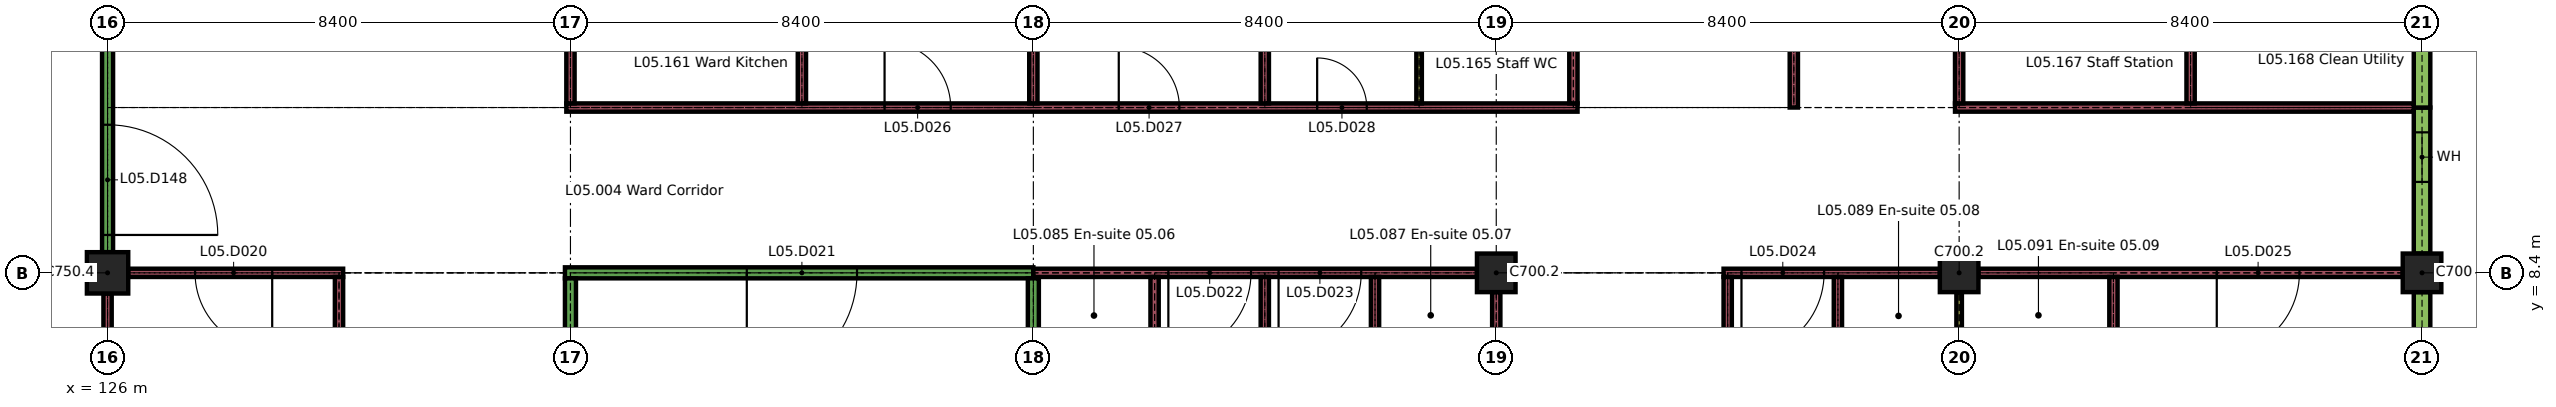
"""IFC4 building model, lengths in metres.
Left out: names, types, materials, properties, quantities, classifications, styles, units other than length and angle.
Written with IfcOpenShell. Run it as: python <this file> out.ifc"""

import sys

from ifc_helpers import new_model, si_unit, direction, frame, frame_2d, origin, origin_2d, place, context, subcontext, project, spatial, rectangle, extrude, element, fill, save


model = new_model("IFC4")
c1 = context("Model", 3, precision=1e-05, world=origin(), true_north=direction((0.0, 1.0)))
c2 = subcontext(c1, "Body", "Model", "MODEL_VIEW")
j1 = project(units=[si_unit("LENGTHUNIT", "METRE"), si_unit("PLANEANGLEUNIT", "RADIAN")], contexts=[c1])
p1 = place(None, origin())
s1 = spatial("IfcSite", under=j1, at=p1, CompositionType="ELEMENT")
p2 = place(p1, origin())
s2 = spatial("IfcBuilding", under=s1, at=p2, CompositionType="ELEMENT")
p3 = place(p2, frame((0.0, 0.0, 22.5)))
s3 = spatial("IfcBuildingStorey", under=s2, at=p3, CompositionType="ELEMENT", Elevation=22.5)
p4 = place(p3, frame((126.0, 8.4, 0.0), z_axis=(0.0, 0.0, 1.0), x_axis=(1.0, 0.0, 0.0)))
e1 = element("IfcColumn", 1, at=p4, inside=s3, PredefinedType="COLUMN", context=c2, shape_type="SweptSolid", body=[
    extrude(rectangle(XDim=0.75, YDim=0.75, at=origin_2d()), origin(), (0.0, 0.0, 1.0), 3.26),
])
for number, where, z_axis, x_axis in (
    (2, (151.2, 8.4, 0.0), (0.0, 0.0, 1.0), (1.0, 0.0, 0.0)),
    (3, (159.6, 8.4, 0.0), (0.0, 0.0, 1.0), (1.0, 0.0, 0.0)),
    (4, (168.0, 8.4, 0.0), (0.0, 0.0, 1.0), (1.0, 0.0, 0.0)),
):
    element("IfcColumn", number, at=place(p3, frame(where, z_axis=z_axis, x_axis=x_axis)), inside=s3, PredefinedType="COLUMN", context=c2, shape_type="SweptSolid", body=[
        extrude(rectangle(XDim=0.7, YDim=0.7, at=origin_2d()), origin(), (0.0, 0.0, 1.0), 3.26),
    ])
p5 = place(p3, frame((168.0, 0.35, 0.0), z_axis=(0.0, 0.0, 1.0), x_axis=(0.0, 1.0, 0.0)))
e5 = element("IfcWall", 5, at=p5, inside=s3, PredefinedType="SOLIDWALL", context=c2, shape_type="SweptSolid", body=[
    extrude(rectangle(XDim=7.7, YDim=0.3, at=frame_2d((3.85, 0.0))), origin(), (0.0, 0.0, 1.0), 2.96),
])
p6 = place(p5, frame((0.7, 0.0, 0.9)))
e6 = element("IfcOpeningElement", 6, at=p6, cuts=e5, PredefinedType="OPENING", context=c2, shape_type="SweptSolid", body=[
    extrude(rectangle(XDim=2.1, YDim=1.5, at=frame_2d((1.05, 0.75))), frame((0.0, 0.16, 0.0), z_axis=(0.0, -1.0, 0.0), x_axis=(1.0, 0.0, 0.0)), (0.0, 0.0, 1.0), 0.32),
])
p7 = place(p5, frame((4.9, 0.0, 0.9)))
e7 = element("IfcOpeningElement", 7, at=p7, cuts=e5, PredefinedType="OPENING", context=c2, shape_type="SweptSolid", body=[
    extrude(rectangle(XDim=2.1, YDim=1.5, at=frame_2d((1.05, 0.75))), frame((0.0, 0.16, 0.0), z_axis=(0.0, -1.0, 0.0), x_axis=(1.0, 0.0, 0.0)), (0.0, 0.0, 1.0), 0.32),
])
p8 = place(p3, frame((168.0, 8.75, 0.0), z_axis=(0.0, 0.0, 1.0), x_axis=(0.0, 1.0, 0.0)))
e8 = element("IfcWall", 8, at=p8, inside=s3, PredefinedType="SOLIDWALL", context=c2, shape_type="SweptSolid", body=[
    extrude(rectangle(XDim=2.65, YDim=0.3, at=frame_2d((1.325, 0.0))), origin(), (0.0, 0.0, 1.0), 2.96),
])
p9 = place(p8, frame((1.3, 0.0, 0.9)))
e9 = element("IfcOpeningElement", 9, at=p9, cuts=e8, PredefinedType="OPENING", context=c2, shape_type="SweptSolid", body=[
    extrude(rectangle(XDim=0.9, YDim=1.5, at=frame_2d((0.45, 0.75))), frame((0.0, 0.16, 0.0), z_axis=(0.0, -1.0, 0.0), x_axis=(1.0, 0.0, 0.0)), (0.0, 0.0, 1.0), 0.32),
])
p10 = place(p3, frame((168.0, 11.4, 0.0), z_axis=(0.0, 0.0, 1.0), x_axis=(0.0, 1.0, 0.0)))
e10 = element("IfcWall", 10, at=p10, inside=s3, PredefinedType="SOLIDWALL", context=c2, shape_type="SweptSolid", body=[
    extrude(rectangle(XDim=2.4, YDim=0.3, at=frame_2d((1.2, 0.0))), origin(), (0.0, 0.0, 1.0), 2.96),
])
p11 = place(p3, frame((126.375, 8.4, 0.0), z_axis=(0.0, 0.0, 1.0), x_axis=(1.0, 0.0, 0.0)))
e11 = element("IfcWall", 11, at=p11, inside=s3, PredefinedType="PARTITIONING", context=c2, shape_type="SweptSolid", body=[
    extrude(rectangle(XDim=3.9, YDim=0.15, at=frame_2d((1.95, 0.0))), origin(), (0.0, 0.0, 1.0), 3.26),
])
p12 = place(p11, frame((1.212, 0.0, 0.0)))
e12 = element("IfcOpeningElement", 12, at=p12, cuts=e11, PredefinedType="OPENING", context=c2, shape_type="SweptSolid", body=[
    extrude(rectangle(XDim=1.4, YDim=2.1, at=frame_2d((0.7, 1.05))), frame((0.0, 0.085, 0.0), z_axis=(0.0, -1.0, 0.0), x_axis=(1.0, 0.0, 0.0)), (0.0, 0.0, 1.0), 0.17),
])
p13 = place(p3, frame((134.3, 8.4, 0.0), z_axis=(0.0, 0.0, 1.0), x_axis=(1.0, 0.0, 0.0)))
e13 = element("IfcWall", 13, at=p13, inside=s3, PredefinedType="PARTITIONING", context=c2, shape_type="SweptSolid", body=[
    extrude(rectangle(XDim=8.5, YDim=0.2, at=frame_2d((4.25, 0.0))), origin(), (0.0, 0.0, 1.0), 3.26),
])
p14 = place(p13, frame((3.3, 0.0, 0.0)))
e14 = element("IfcOpeningElement", 14, at=p14, cuts=e13, PredefinedType="OPENING", context=c2, shape_type="SweptSolid", body=[
    extrude(rectangle(XDim=2.0, YDim=2.4, at=frame_2d((1.0, 1.2))), frame((0.0, 0.11, 0.0), z_axis=(0.0, -1.0, 0.0), x_axis=(1.0, 0.0, 0.0)), (0.0, 0.0, 1.0), 0.22),
])
p15 = place(p3, frame((142.8, 8.4, 0.0), z_axis=(0.0, 0.0, 1.0), x_axis=(1.0, 0.0, 0.0)))
e15 = element("IfcWall", 15, at=p15, inside=s3, PredefinedType="PARTITIONING", context=c2, shape_type="SweptSolid", body=[
    extrude(rectangle(XDim=8.05, YDim=0.15, at=frame_2d((4.025, 0.0))), origin(), (0.0, 0.0, 1.0), 3.26),
])
p16 = place(p15, frame((2.45, 0.0, 0.0)))
e16 = element("IfcOpeningElement", 16, at=p16, cuts=e15, PredefinedType="OPENING", context=c2, shape_type="SweptSolid", body=[
    extrude(rectangle(XDim=1.5, YDim=2.4, at=frame_2d((0.75, 1.2))), frame((0.0, 0.085, 0.0), z_axis=(0.0, -1.0, 0.0), x_axis=(1.0, 0.0, 0.0)), (0.0, 0.0, 1.0), 0.17),
])
p17 = place(p15, frame((4.45, 0.0, 0.0)))
e17 = element("IfcOpeningElement", 17, at=p17, cuts=e15, PredefinedType="OPENING", context=c2, shape_type="SweptSolid", body=[
    extrude(rectangle(XDim=1.5, YDim=2.4, at=frame_2d((0.75, 1.2))), frame((0.0, 0.085, 0.0), z_axis=(0.0, -1.0, 0.0), x_axis=(1.0, 0.0, 0.0)), (0.0, 0.0, 1.0), 0.17),
])
p18 = place(p3, frame((155.325, 8.4, 0.0), z_axis=(0.0, 0.0, 1.0), x_axis=(1.0, 0.0, 0.0)))
e18 = element("IfcWall", 18, at=p18, inside=s3, PredefinedType="PARTITIONING", context=c2, shape_type="SweptSolid", body=[
    extrude(rectangle(XDim=3.925, YDim=0.15, at=frame_2d((1.962, 0.0))), origin(), (0.0, 0.0, 1.0), 3.26),
])
p19 = place(p18, frame((0.325, 0.0, 0.0)))
e19 = element("IfcOpeningElement", 19, at=p19, cuts=e18, PredefinedType="OPENING", context=c2, shape_type="SweptSolid", body=[
    extrude(rectangle(XDim=1.5, YDim=2.4, at=frame_2d((0.75, 1.2))), frame((0.0, 0.085, 0.0), z_axis=(0.0, -1.0, 0.0), x_axis=(1.0, 0.0, 0.0)), (0.0, 0.0, 1.0), 0.17),
])
p20 = place(p3, frame((159.95, 8.4, 0.0), z_axis=(0.0, 0.0, 1.0), x_axis=(1.0, 0.0, 0.0)))
e20 = element("IfcWall", 20, at=p20, inside=s3, PredefinedType="PARTITIONING", context=c2, shape_type="SweptSolid", body=[
    extrude(rectangle(XDim=7.7, YDim=0.15, at=frame_2d((3.85, 0.0))), origin(), (0.0, 0.0, 1.0), 3.26),
])
p21 = place(p20, frame((4.325, 0.0, 0.0)))
e21 = element("IfcOpeningElement", 21, at=p21, cuts=e20, PredefinedType="OPENING", context=c2, shape_type="SweptSolid", body=[
    extrude(rectangle(XDim=1.5, YDim=2.4, at=frame_2d((0.75, 1.2))), frame((0.0, 0.085, 0.0), z_axis=(0.0, -1.0, 0.0), x_axis=(1.0, 0.0, 0.0)), (0.0, 0.0, 1.0), 0.17),
])
p22 = place(p3, frame((134.325, 11.4, 0.0), z_axis=(0.0, 0.0, 1.0), x_axis=(1.0, 0.0, 0.0)))
e22 = element("IfcWall", 22, at=p22, inside=s3, PredefinedType="PARTITIONING", context=c2, shape_type="SweptSolid", body=[
    extrude(rectangle(XDim=18.35, YDim=0.15, at=frame_2d((9.175, 0.0))), origin(), (0.0, 0.0, 1.0), 3.26),
])
p23 = place(p22, frame((5.775, 0.0, 0.0)))
e23 = element("IfcOpeningElement", 23, at=p23, cuts=e22, PredefinedType="OPENING", context=c2, shape_type="SweptSolid", body=[
    extrude(rectangle(XDim=1.2, YDim=2.1, at=frame_2d((0.6, 1.05))), frame((0.0, 0.085, 0.0), z_axis=(0.0, -1.0, 0.0), x_axis=(1.0, 0.0, 0.0)), (0.0, 0.0, 1.0), 0.17),
])
p24 = place(p22, frame((10.025, 0.0, 0.0)))
e24 = element("IfcOpeningElement", 24, at=p24, cuts=e22, PredefinedType="OPENING", context=c2, shape_type="SweptSolid", body=[
    extrude(rectangle(XDim=1.1, YDim=2.1, at=frame_2d((0.55, 1.05))), frame((0.0, 0.085, 0.0), z_axis=(0.0, -1.0, 0.0), x_axis=(1.0, 0.0, 0.0)), (0.0, 0.0, 1.0), 0.17),
])
p25 = place(p22, frame((13.625, 0.0, 0.0)))
e25 = element("IfcOpeningElement", 25, at=p25, cuts=e22, PredefinedType="OPENING", context=c2, shape_type="SweptSolid", body=[
    extrude(rectangle(XDim=0.9, YDim=2.1, at=frame_2d((0.45, 1.05))), frame((0.0, 0.085, 0.0), z_axis=(0.0, -1.0, 0.0), x_axis=(1.0, 0.0, 0.0)), (0.0, 0.0, 1.0), 0.17),
])
p26 = place(p3, frame((159.525, 11.4, 0.0), z_axis=(0.0, 0.0, 1.0), x_axis=(1.0, 0.0, 0.0)))
e26 = element("IfcWall", 26, at=p26, inside=s3, PredefinedType="PARTITIONING", context=c2, shape_type="SweptSolid", body=[
    extrude(rectangle(XDim=8.325, YDim=0.15, at=frame_2d((4.163, 0.0))), origin(), (0.0, 0.0, 1.0), 3.26),
])
p27 = place(p3, frame((126.0, 0.375, 0.0), z_axis=(0.0, 0.0, 1.0), x_axis=(0.0, 1.0, 0.0)))
e27 = element("IfcWall", 27, at=p27, inside=s3, PredefinedType="PARTITIONING", context=c2, shape_type="SweptSolid", body=[
    extrude(rectangle(XDim=7.65, YDim=0.15, at=frame_2d((3.825, 0.0))), origin(), (0.0, 0.0, 1.0), 3.26),
])
p28 = place(p3, frame((126.0, 8.775, 0.0), z_axis=(0.0, 0.0, 1.0), x_axis=(0.0, 1.0, 0.0)))
e28 = element("IfcWall", 28, at=p28, inside=s3, PredefinedType="PARTITIONING", context=c2, shape_type="SweptSolid", body=[
    extrude(rectangle(XDim=7.925, YDim=0.2, at=frame_2d((3.962, 0.0))), origin(), (0.0, 0.0, 1.0), 3.26),
])
p29 = place(p28, frame((0.312, 0.0, 0.0)))
e29 = element("IfcOpeningElement", 29, at=p29, cuts=e28, PredefinedType="OPENING", context=c2, shape_type="SweptSolid", body=[
    extrude(rectangle(XDim=2.0, YDim=2.4, at=frame_2d((1.0, 1.2))), frame((0.0, 0.11, 0.0), z_axis=(0.0, -1.0, 0.0), x_axis=(1.0, 0.0, 0.0)), (0.0, 0.0, 1.0), 0.22),
])
p30 = place(p28, frame((5.475, 0.0, 0.0)))
e30 = element("IfcOpeningElement", 30, at=p30, cuts=e28, PredefinedType="OPENING", context=c2, shape_type="SweptSolid", body=[
    extrude(rectangle(XDim=2.0, YDim=2.4, at=frame_2d((1.0, 1.2))), frame((0.0, 0.11, 0.0), z_axis=(0.0, -1.0, 0.0), x_axis=(1.0, 0.0, 0.0)), (0.0, 0.0, 1.0), 0.22),
])
p31 = place(p3, frame((130.2, 0.15, 0.0), z_axis=(0.0, 0.0, 1.0), x_axis=(0.0, 1.0, 0.0)))
e31 = element("IfcWall", 31, at=p31, inside=s3, PredefinedType="PARTITIONING", context=c2, shape_type="SweptSolid", body=[
    extrude(rectangle(XDim=8.175, YDim=0.15, at=frame_2d((4.087, 0.0))), origin(), (0.0, 0.0, 1.0), 3.26),
])
p32 = place(p3, frame((134.4, 3.6, 0.0), z_axis=(0.0, 0.0, 1.0), x_axis=(0.0, 1.0, 0.0)))
e32 = element("IfcWall", 32, at=p32, inside=s3, PredefinedType="PARTITIONING", context=c2, shape_type="SweptSolid", body=[
    extrude(rectangle(XDim=4.7, YDim=0.2, at=frame_2d((2.35, 0.0))), origin(), (0.0, 0.0, 1.0), 3.26),
])
for number, where, z_axis, x_axis in (
    (33, (134.4, 11.475, 0.0), (0.0, 0.0, 1.0), (0.0, 1.0, 0.0)),
    (34, (138.6, 11.475, 0.0), (0.0, 0.0, 1.0), (0.0, 1.0, 0.0)),
):
    element("IfcWall", number, at=place(p3, frame(where, z_axis=z_axis, x_axis=x_axis)), inside=s3, PredefinedType="PARTITIONING", context=c2, shape_type="SweptSolid", body=[
        extrude(rectangle(XDim=2.25, YDim=0.15, at=frame_2d((1.125, 0.0))), origin(), (0.0, 0.0, 1.0), 3.26),
    ])
p33 = place(p3, frame((142.8, 3.6, 0.0), z_axis=(0.0, 0.0, 1.0), x_axis=(0.0, 1.0, 0.0)))
e35 = element("IfcWall", 35, at=p33, inside=s3, PredefinedType="PARTITIONING", context=c2, shape_type="SweptSolid", body=[
    extrude(rectangle(XDim=4.7, YDim=0.2, at=frame_2d((2.35, 0.0))), origin(), (0.0, 0.0, 1.0), 3.26),
])
for number, where, z_axis, x_axis in (
    (36, (142.8, 11.475, 0.0), (0.0, 0.0, 1.0), (0.0, 1.0, 0.0)),
    (37, (145.0, 6.075, 0.0), (0.0, 0.0, 1.0), (0.0, 1.0, 0.0)),
):
    element("IfcWall", number, at=place(p3, frame(where, z_axis=z_axis, x_axis=x_axis)), inside=s3, PredefinedType="PARTITIONING", context=c2, shape_type="SweptSolid", body=[
        extrude(rectangle(XDim=2.25, YDim=0.15, at=frame_2d((1.125, 0.0))), origin(), (0.0, 0.0, 1.0), 3.26),
    ])
p34 = place(p3, frame((147.0, 0.15, 0.0), z_axis=(0.0, 0.0, 1.0), x_axis=(0.0, 1.0, 0.0)))
e38 = element("IfcWall", 38, at=p34, inside=s3, PredefinedType="PARTITIONING", context=c2, shape_type="SweptSolid", body=[
    extrude(rectangle(XDim=8.175, YDim=0.15, at=frame_2d((4.087, 0.0))), origin(), (0.0, 0.0, 1.0), 3.26),
])
for number, where, z_axis, x_axis in (
    (39, (147.0, 11.475, 0.0), (0.0, 0.0, 1.0), (0.0, 1.0, 0.0)),
    (40, (149.0, 6.075, 0.0), (0.0, 0.0, 1.0), (0.0, 1.0, 0.0)),
):
    element("IfcWall", number, at=place(p3, frame(where, z_axis=z_axis, x_axis=x_axis)), inside=s3, PredefinedType="PARTITIONING", context=c2, shape_type="SweptSolid", body=[
        extrude(rectangle(XDim=2.25, YDim=0.15, at=frame_2d((1.125, 0.0))), origin(), (0.0, 0.0, 1.0), 3.26),
    ])
p35 = place(p3, frame((149.8, 11.475, 0.0), z_axis=(0.0, 0.0, 1.0), x_axis=(0.0, 1.0, 0.0)))
e41 = element("IfcWall", 41, at=p35, inside=s3, PredefinedType="PARTITIONING", context=c2, shape_type="SweptSolid", body=[
    extrude(rectangle(XDim=2.25, YDim=0.1, at=frame_2d((1.125, 0.0))), origin(), (0.0, 0.0, 1.0), 3.26),
])
p36 = place(p3, frame((151.2, 0.35, 0.0), z_axis=(0.0, 0.0, 1.0), x_axis=(0.0, 1.0, 0.0)))
e42 = element("IfcWall", 42, at=p36, inside=s3, PredefinedType="PARTITIONING", context=c2, shape_type="SweptSolid", body=[
    extrude(rectangle(XDim=7.7, YDim=0.15, at=frame_2d((3.85, 0.0))), origin(), (0.0, 0.0, 1.0), 3.26),
])
p37 = place(p3, frame((152.6, 11.475, 0.0), z_axis=(0.0, 0.0, 1.0), x_axis=(0.0, 1.0, 0.0)))
e43 = element("IfcWall", 43, at=p37, inside=s3, PredefinedType="PARTITIONING", context=c2, shape_type="SweptSolid", body=[
    extrude(rectangle(XDim=2.25, YDim=0.15, at=frame_2d((1.125, 0.0))), origin(), (0.0, 0.0, 1.0), 3.26),
])
p38 = place(p3, frame((155.4, 0.15, 0.0), z_axis=(0.0, 0.0, 1.0), x_axis=(0.0, 1.0, 0.0)))
e44 = element("IfcWall", 44, at=p38, inside=s3, PredefinedType="PARTITIONING", context=c2, shape_type="SweptSolid", body=[
    extrude(rectangle(XDim=8.175, YDim=0.15, at=frame_2d((4.087, 0.0))), origin(), (0.0, 0.0, 1.0), 3.26),
])
p39 = place(p3, frame((156.6, 11.4, 0.0), z_axis=(0.0, 0.0, 1.0), x_axis=(0.0, 1.0, 0.0)))
e45 = element("IfcWall", 45, at=p39, inside=s3, PredefinedType="PARTITIONING", context=c2, shape_type="SweptSolid", body=[
    extrude(rectangle(XDim=2.325, YDim=0.15, at=frame_2d((1.163, 0.0))), origin(), (0.0, 0.0, 1.0), 3.26),
])
p40 = place(p3, frame((157.4, 6.075, 0.0), z_axis=(0.0, 0.0, 1.0), x_axis=(0.0, 1.0, 0.0)))
e46 = element("IfcWall", 46, at=p40, inside=s3, PredefinedType="PARTITIONING", context=c2, shape_type="SweptSolid", body=[
    extrude(rectangle(XDim=2.25, YDim=0.15, at=frame_2d((1.125, 0.0))), origin(), (0.0, 0.0, 1.0), 3.26),
])
p41 = place(p3, frame((159.6, 6.075, 0.0), z_axis=(0.0, 0.0, 1.0), x_axis=(0.0, 1.0, 0.0)))
e47 = element("IfcWall", 47, at=p41, inside=s3, PredefinedType="PARTITIONING", context=c2, shape_type="SweptSolid", body=[
    extrude(rectangle(XDim=1.975, YDim=0.1, at=frame_2d((0.988, 0.0))), origin(), (0.0, 0.0, 1.0), 3.26),
])
for number, where, z_axis, x_axis in (
    (48, (159.6, 11.475, 0.0), (0.0, 0.0, 1.0), (0.0, 1.0, 0.0)),
    (49, (162.4, 6.075, 0.0), (0.0, 0.0, 1.0), (0.0, 1.0, 0.0)),
    (50, (163.8, 11.475, 0.0), (0.0, 0.0, 1.0), (0.0, 1.0, 0.0)),
):
    element("IfcWall", number, at=place(p3, frame(where, z_axis=z_axis, x_axis=x_axis)), inside=s3, PredefinedType="PARTITIONING", context=c2, shape_type="SweptSolid", body=[
        extrude(rectangle(XDim=2.25, YDim=0.15, at=frame_2d((1.125, 0.0))), origin(), (0.0, 0.0, 1.0), 3.26),
    ])
p42 = place(p9, origin())
e51 = element("IfcWindow", 51, at=p42, inside=s3, PartitioningType="SINGLE_PANEL", PredefinedType="WINDOW", context=c2, shape_type="SweptSolid", body=[
    extrude(rectangle(XDim=0.9, YDim=1.5, at=frame_2d((0.45, 0.75))), frame((0.0, 0.03, 0.0), z_axis=(0.0, -1.0, 0.0), x_axis=(1.0, 0.0, 0.0)), (0.0, 0.0, 1.0), 0.06),
])
fill(e9, e51)
p43 = place(p12, origin())
e52 = element("IfcDoor", 52, at=p43, inside=s3, OperationType="SINGLE_SWING_RIGHT", PredefinedType="DOOR", context=c2, shape_type="SweptSolid", body=[
    extrude(rectangle(XDim=1.4, YDim=2.1, at=frame_2d((0.7, 1.05))), frame((0.0, 0.025, 0.0), z_axis=(0.0, -1.0, 0.0), x_axis=(1.0, 0.0, 0.0)), (0.0, 0.0, 1.0), 0.05),
])
fill(e12, e52)
p44 = place(p14, origin())
e53 = element("IfcDoor", 53, at=p44, inside=s3, OperationType="SINGLE_SWING_LEFT", PredefinedType="DOOR", context=c2, shape_type="SweptSolid", body=[
    extrude(rectangle(XDim=2.0, YDim=2.4, at=frame_2d((1.0, 1.2))), frame((0.0, 0.03, 0.0), z_axis=(0.0, -1.0, 0.0), x_axis=(1.0, 0.0, 0.0)), (0.0, 0.0, 1.0), 0.06),
])
fill(e14, e53)
p45 = place(p16, origin())
e54 = element("IfcDoor", 54, at=p45, inside=s3, OperationType="SINGLE_SWING_LEFT", PredefinedType="DOOR", context=c2, shape_type="SweptSolid", body=[
    extrude(rectangle(XDim=1.5, YDim=2.4, at=frame_2d((0.75, 1.2))), frame((0.0, 0.03, 0.0), z_axis=(0.0, -1.0, 0.0), x_axis=(1.0, 0.0, 0.0)), (0.0, 0.0, 1.0), 0.06),
])
fill(e16, e54)
p46 = place(p17, origin())
e55 = element("IfcDoor", 55, at=p46, inside=s3, OperationType="SINGLE_SWING_LEFT", PredefinedType="DOOR", context=c2, shape_type="SweptSolid", body=[
    extrude(rectangle(XDim=1.5, YDim=2.4, at=frame_2d((0.75, 1.2))), frame((0.0, 0.03, 0.0), z_axis=(0.0, -1.0, 0.0), x_axis=(1.0, 0.0, 0.0)), (0.0, 0.0, 1.0), 0.06),
])
fill(e17, e55)
p47 = place(p19, origin())
e56 = element("IfcDoor", 56, at=p47, inside=s3, OperationType="SINGLE_SWING_LEFT", PredefinedType="DOOR", context=c2, shape_type="SweptSolid", body=[
    extrude(rectangle(XDim=1.5, YDim=2.4, at=frame_2d((0.75, 1.2))), frame((0.0, 0.03, 0.0), z_axis=(0.0, -1.0, 0.0), x_axis=(1.0, 0.0, 0.0)), (0.0, 0.0, 1.0), 0.06),
])
fill(e19, e56)
p48 = place(p21, origin())
e57 = element("IfcDoor", 57, at=p48, inside=s3, OperationType="SINGLE_SWING_LEFT", PredefinedType="DOOR", context=c2, shape_type="SweptSolid", body=[
    extrude(rectangle(XDim=1.5, YDim=2.4, at=frame_2d((0.75, 1.2))), frame((0.0, 0.03, 0.0), z_axis=(0.0, -1.0, 0.0), x_axis=(1.0, 0.0, 0.0)), (0.0, 0.0, 1.0), 0.06),
])
fill(e21, e57)
p49 = place(p23, origin())
e58 = element("IfcDoor", 58, at=p49, inside=s3, OperationType="SINGLE_SWING_RIGHT", PredefinedType="DOOR", context=c2, shape_type="SweptSolid", body=[
    extrude(rectangle(XDim=1.2, YDim=2.1, at=frame_2d((0.6, 1.05))), frame((0.0, 0.025, 0.0), z_axis=(0.0, -1.0, 0.0), x_axis=(1.0, 0.0, 0.0)), (0.0, 0.0, 1.0), 0.05),
])
fill(e23, e58)
p50 = place(p24, origin())
e59 = element("IfcDoor", 59, at=p50, inside=s3, OperationType="SINGLE_SWING_RIGHT", PredefinedType="DOOR", context=c2, shape_type="SweptSolid", body=[
    extrude(rectangle(XDim=1.1, YDim=2.1, at=frame_2d((0.55, 1.05))), frame((0.0, 0.025, 0.0), z_axis=(0.0, -1.0, 0.0), x_axis=(1.0, 0.0, 0.0)), (0.0, 0.0, 1.0), 0.05),
])
fill(e24, e59)
p51 = place(p25, origin())
e60 = element("IfcDoor", 60, at=p51, inside=s3, OperationType="SINGLE_SWING_RIGHT", PredefinedType="DOOR", context=c2, shape_type="SweptSolid", body=[
    extrude(rectangle(XDim=0.9, YDim=2.1, at=frame_2d((0.45, 1.05))), frame((0.0, 0.02, 0.0), z_axis=(0.0, -1.0, 0.0), x_axis=(1.0, 0.0, 0.0)), (0.0, 0.0, 1.0), 0.04),
])
fill(e25, e60)
p52 = place(p29, origin())
e61 = element("IfcDoor", 61, at=p52, inside=s3, OperationType="SINGLE_SWING_LEFT", PredefinedType="DOOR", context=c2, shape_type="SweptSolid", body=[
    extrude(rectangle(XDim=2.0, YDim=2.4, at=frame_2d((1.0, 1.2))), frame((0.0, 0.03, 0.0), z_axis=(0.0, -1.0, 0.0), x_axis=(1.0, 0.0, 0.0)), (0.0, 0.0, 1.0), 0.06),
])
fill(e29, e61)
save(model, sys.argv[1])
